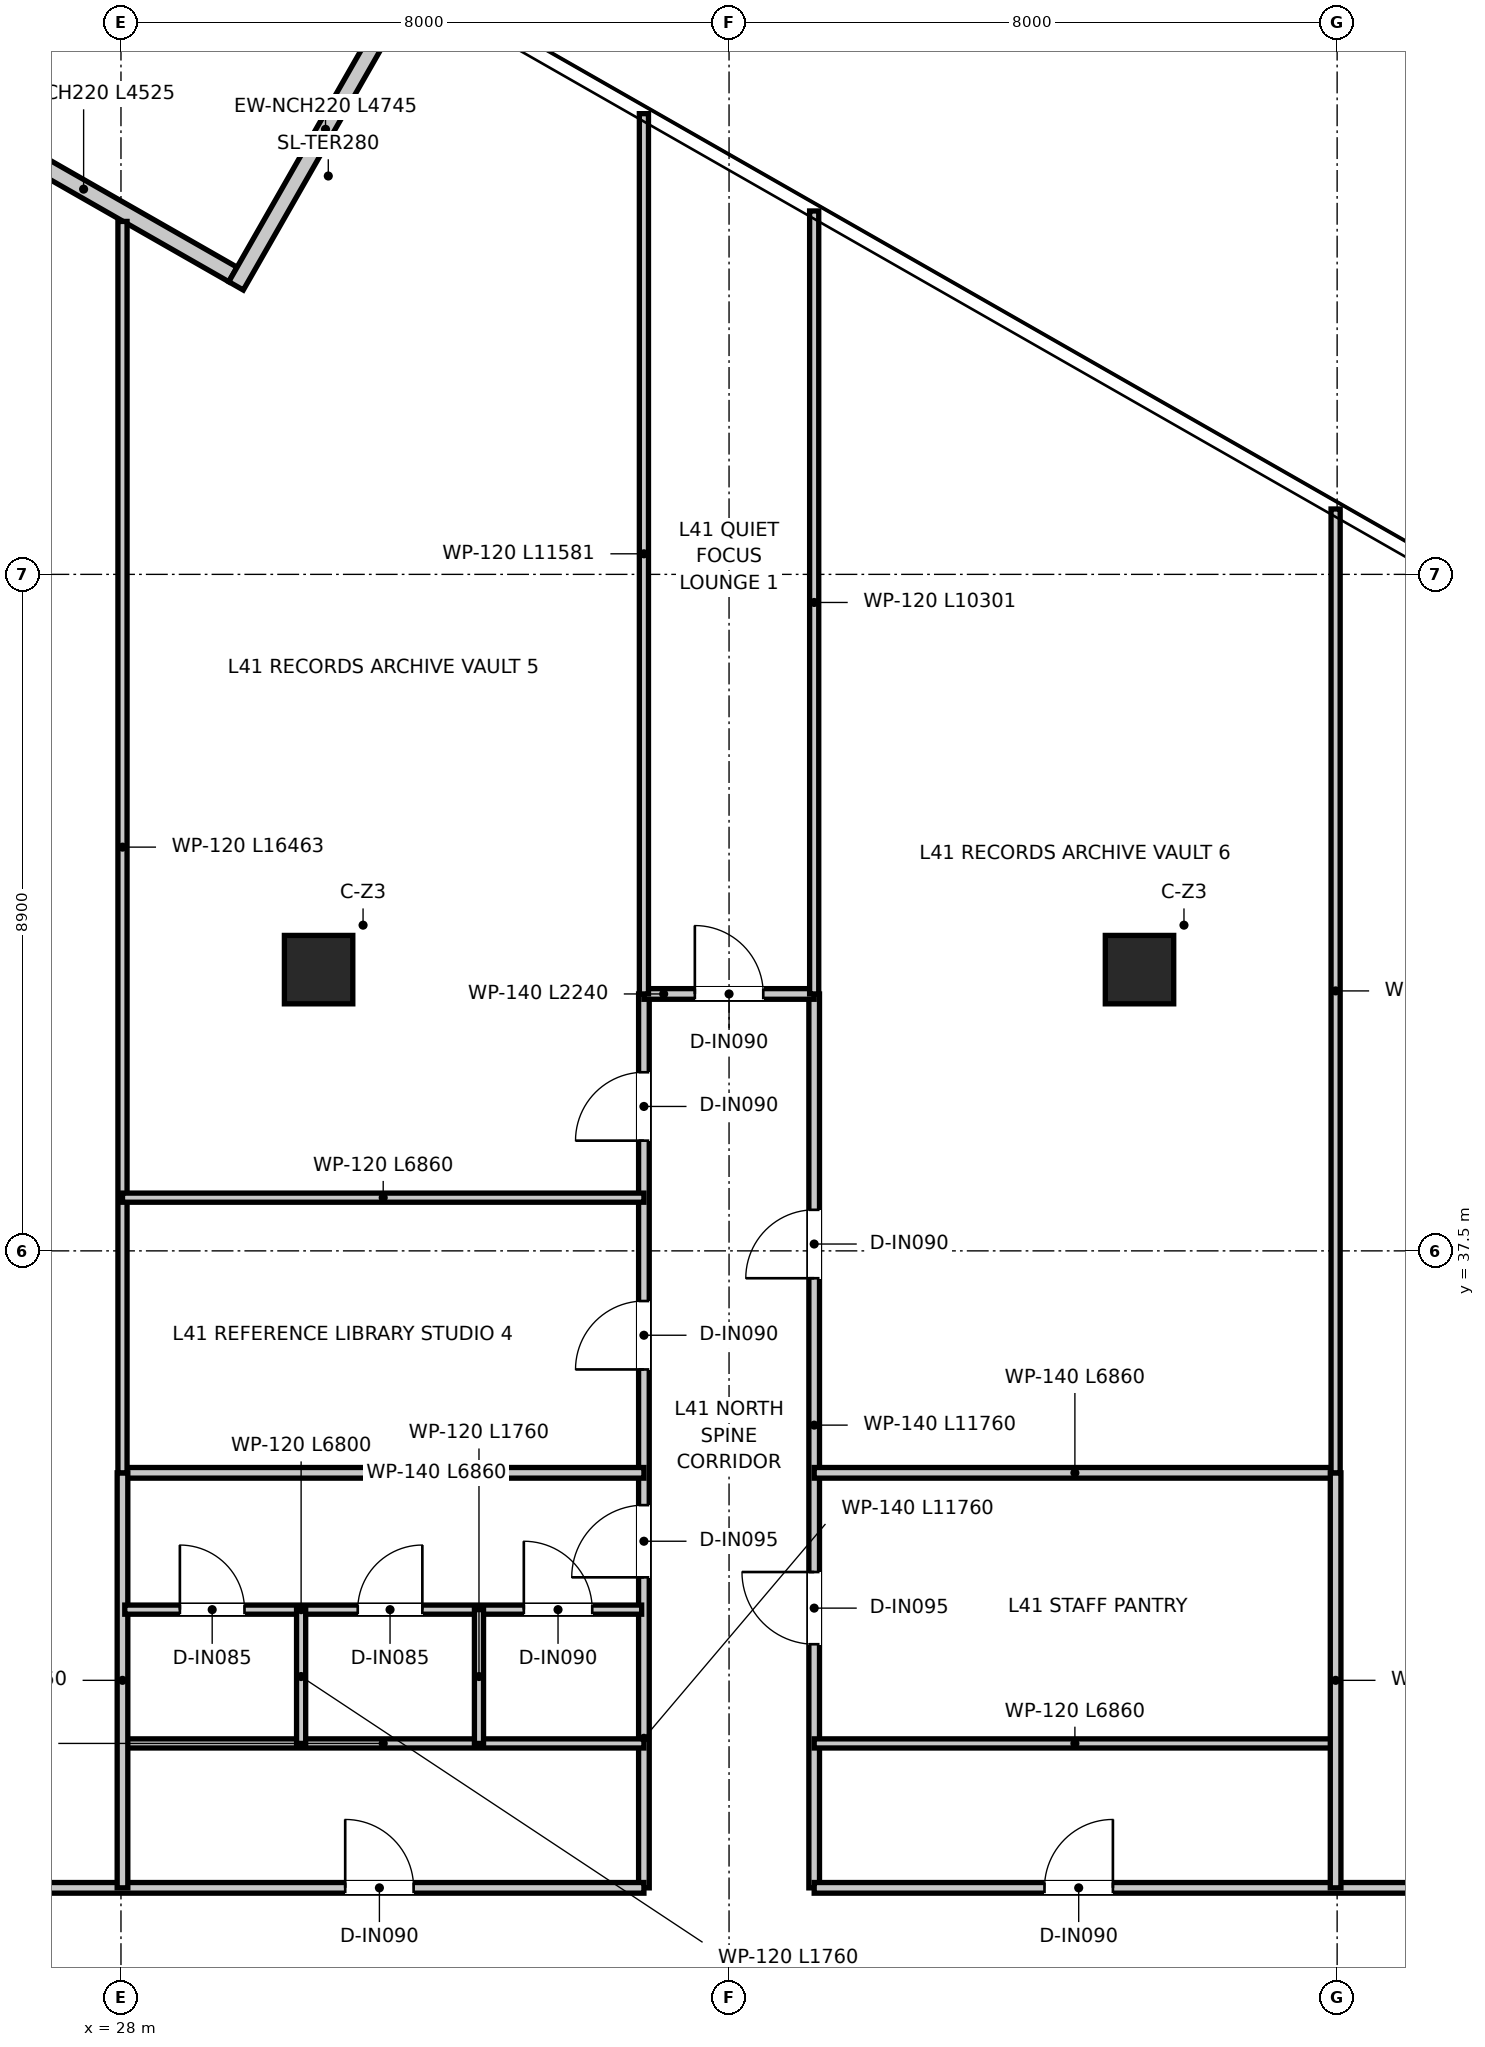
"""IFC4 building model, lengths in metres.
Left out: names, types, materials, properties, quantities, classifications, styles, units other than length and angle.
Written with IfcOpenShell. Run it as: python <this file> out.ifc"""

import sys

from ifc_helpers import new_model, si_unit, direction, frame, frame_2d, origin, origin_2d, place, context, subcontext, project, spatial, rectangle, extrude, source, transform, mapped, element, fill, save


model = new_model("IFC4")
c1 = context("Model", 3, precision=1e-05, world=origin(), true_north=direction((0.0, 1.0)))
c2 = subcontext(c1, "Body", "Model", "MODEL_VIEW")
j1 = project(units=[si_unit("LENGTHUNIT", "METRE"), si_unit("PLANEANGLEUNIT", "RADIAN")], contexts=[c1])
p1 = place(None, origin())
s1 = spatial("IfcSite", under=j1, at=p1, CompositionType="ELEMENT")
p2 = place(p1, origin())
s2 = spatial("IfcBuilding", under=s1, at=p2, CompositionType="ELEMENT")
p3 = place(p2, frame((0.0, 0.0, 169.9)))
s3 = spatial("IfcBuildingStorey", under=s2, at=p3, CompositionType="ELEMENT", Elevation=169.9)
m1 = source(origin(), c2, "Body", "SweptSolid", [
    extrude(rectangle(XDim=0.9, YDim=0.9, at=origin_2d()), origin(), (0.0, 0.0, 1.0), 3.95),
])
for number, where, z_axis, x_axis in (
    (1, (30.6, 41.2, 0.0), (0.0, 0.0, 1.0), (1.0, 0.0, 0.0)),
    (2, (41.4, 41.2, 0.0), (0.0, 0.0, 1.0), (1.0, 0.0, 0.0)),
):
    element("IfcColumn", number, at=place(p3, frame(where, z_axis=z_axis, x_axis=x_axis)), inside=s3, PredefinedType="COLUMN", context=c2, shape_type="MappedRepresentation", body=[
        mapped(m1, transform((0.0, 0.0, 0.0), x_axis=(1.0, 0.0, 0.0), y_axis=(0.0, 1.0, 0.0), z_axis=(0.0, 0.0, 1.0), scale=1.0)),
    ])
p4 = place(p3, frame((29.473, 50.345, 0.0), z_axis=(0.0, 0.0, 1.0), x_axis=(-0.868170087613, 0.496266761908, 0.0)))
e3 = element("IfcWall", 3, at=p4, inside=s3, PredefinedType="ELEMENTEDWALL", context=c2, shape_type="SweptSolid", body=[
    extrude(rectangle(XDim=4.525, YDim=0.22, at=frame_2d((2.262, 0.0))), origin(), (0.0, 0.0, 1.0), 3.67),
])
p5 = place(p3, frame((31.868, 54.315, 0.0), z_axis=(0.0, 0.0, 1.0), x_axis=(-0.496205429031, -0.868205144076, 0.0)))
e4 = element("IfcWall", 4, at=p5, inside=s3, PredefinedType="ELEMENTEDWALL", context=c2, shape_type="SweptSolid", body=[
    extrude(rectangle(XDim=4.745, YDim=0.22, at=frame_2d((2.373, 0.0))), origin(), (0.0, 0.0, 1.0), 3.67),
])
p6 = place(p3, frame((34.88, 29.12, 0.0), z_axis=(0.0, 0.0, 1.0), x_axis=(0.0, 1.0, 0.0)))
e5 = element("IfcWall", 5, at=p6, inside=s3, PredefinedType="PARTITIONING", context=c2, shape_type="SweptSolid", body=[
    extrude(rectangle(XDim=11.76, YDim=0.14, at=frame_2d((5.88, 0.0))), origin(), (0.0, 0.0, 1.0), 3.03),
])
p7 = place(p6, frame((4.085, 0.0, 0.0)))
e6 = element("IfcOpeningElement", 6, at=p7, cuts=e5, PredefinedType="OPENING", context=c2, shape_type="SweptSolid", body=[
    extrude(rectangle(XDim=0.95, YDim=2.1, at=frame_2d((0.475, 1.05))), frame((0.0, 0.08, 0.0), z_axis=(0.0, -1.0, 0.0), x_axis=(1.0, 0.0, 0.0)), (0.0, 0.0, 1.0), 0.16),
])
p8 = place(p6, frame((6.82, 0.0, 0.0)))
e7 = element("IfcOpeningElement", 7, at=p8, cuts=e5, PredefinedType="OPENING", context=c2, shape_type="SweptSolid", body=[
    extrude(rectangle(XDim=0.9, YDim=2.1, at=frame_2d((0.45, 1.05))), frame((0.0, 0.08, 0.0), z_axis=(0.0, -1.0, 0.0), x_axis=(1.0, 0.0, 0.0)), (0.0, 0.0, 1.0), 0.16),
])
p9 = place(p6, frame((9.83, 0.0, 0.0)))
e8 = element("IfcOpeningElement", 8, at=p9, cuts=e5, PredefinedType="OPENING", context=c2, shape_type="SweptSolid", body=[
    extrude(rectangle(XDim=0.9, YDim=2.1, at=frame_2d((0.45, 1.05))), frame((0.0, 0.08, 0.0), z_axis=(0.0, -1.0, 0.0), x_axis=(1.0, 0.0, 0.0)), (0.0, 0.0, 1.0), 0.16),
])
p10 = place(p3, frame((37.12, 29.12, 0.0), z_axis=(0.0, 0.0, 1.0), x_axis=(0.0, 1.0, 0.0)))
e9 = element("IfcWall", 9, at=p10, inside=s3, PredefinedType="PARTITIONING", context=c2, shape_type="SweptSolid", body=[
    extrude(rectangle(XDim=11.76, YDim=0.14, at=frame_2d((5.88, 0.0))), origin(), (0.0, 0.0, 1.0), 3.03),
])
p11 = place(p10, frame((3.205, 0.0, 0.0)))
e10 = element("IfcOpeningElement", 10, at=p11, cuts=e9, PredefinedType="OPENING", context=c2, shape_type="SweptSolid", body=[
    extrude(rectangle(XDim=0.95, YDim=2.1, at=frame_2d((0.475, 1.05))), frame((0.0, 0.08, 0.0), z_axis=(0.0, -1.0, 0.0), x_axis=(1.0, 0.0, 0.0)), (0.0, 0.0, 1.0), 0.16),
])
p12 = place(p10, frame((8.02, 0.0, 0.0)))
e11 = element("IfcOpeningElement", 11, at=p12, cuts=e9, PredefinedType="OPENING", context=c2, shape_type="SweptSolid", body=[
    extrude(rectangle(XDim=0.9, YDim=2.1, at=frame_2d((0.45, 1.05))), frame((0.0, 0.08, 0.0), z_axis=(0.0, -1.0, 0.0), x_axis=(1.0, 0.0, 0.0)), (0.0, 0.0, 1.0), 0.16),
])
p13 = place(p3, frame((34.88, 40.88, 0.0), z_axis=(0.0, 0.0, 1.0), x_axis=(1.0, 0.0, 0.0)))
e12 = element("IfcWall", 12, at=p13, inside=s3, PredefinedType="PARTITIONING", context=c2, shape_type="SweptSolid", body=[
    extrude(rectangle(XDim=2.24, YDim=0.14, at=frame_2d((1.12, 0.0))), origin(), (0.0, 0.0, 1.0), 3.67),
])
p14 = place(p13, frame((0.67, 0.0, 0.0)))
e13 = element("IfcOpeningElement", 13, at=p14, cuts=e12, PredefinedType="OPENING", context=c2, shape_type="SweptSolid", body=[
    extrude(rectangle(XDim=0.9, YDim=2.1, at=frame_2d((0.45, 1.05))), frame((0.0, 0.08, 0.0), z_axis=(0.0, -1.0, 0.0), x_axis=(1.0, 0.0, 0.0)), (0.0, 0.0, 1.0), 0.16),
])
p15 = place(p3, frame((12.262, 29.12, 0.0), z_axis=(0.0, 0.0, 1.0), x_axis=(1.0, 0.0, 0.0)))
e14 = element("IfcWall", 14, at=p15, inside=s3, PredefinedType="PARTITIONING", context=c2, shape_type="SweptSolid", body=[
    extrude(rectangle(XDim=22.618, YDim=0.14, at=frame_2d((11.309, 0.0))), origin(), (0.0, 0.0, 1.0), 3.03),
])
p16 = place(p15, frame((18.688, 0.0, 0.0)))
e15 = element("IfcOpeningElement", 15, at=p16, cuts=e14, PredefinedType="OPENING", context=c2, shape_type="SweptSolid", body=[
    extrude(rectangle(XDim=0.9, YDim=2.1, at=frame_2d((0.45, 1.05))), frame((0.0, 0.08, 0.0), z_axis=(0.0, -1.0, 0.0), x_axis=(1.0, 0.0, 0.0)), (0.0, 0.0, 1.0), 0.16),
])
p17 = place(p15, frame((3.514, 0.0, 0.0)))
e16 = element("IfcOpeningElement", 16, at=p17, cuts=e14, PredefinedType="OPENING", context=c2, shape_type="SweptSolid", body=[
    extrude(rectangle(XDim=0.9, YDim=2.1, at=frame_2d((0.45, 1.05))), frame((0.0, 0.08, 0.0), z_axis=(0.0, -1.0, 0.0), x_axis=(1.0, 0.0, 0.0)), (0.0, 0.0, 1.0), 0.16),
])
p18 = place(p15, frame((12.588, 0.0, 0.0)))
e17 = element("IfcOpeningElement", 17, at=p18, cuts=e14, PredefinedType="OPENING", context=c2, shape_type="SweptSolid", body=[
    extrude(rectangle(XDim=0.9, YDim=2.1, at=frame_2d((0.45, 1.05))), frame((0.0, 0.08, 0.0), z_axis=(0.0, -1.0, 0.0), x_axis=(1.0, 0.0, 0.0)), (0.0, 0.0, 1.0), 0.16),
])
p19 = place(p3, frame((37.12, 29.12, 0.0), z_axis=(0.0, 0.0, 1.0), x_axis=(1.0, 0.0, 0.0)))
e18 = element("IfcWall", 18, at=p19, inside=s3, PredefinedType="PARTITIONING", context=c2, shape_type="SweptSolid", body=[
    extrude(rectangle(XDim=25.384, YDim=0.14, at=frame_2d((12.692, 0.0))), origin(), (0.0, 0.0, 1.0), 3.03),
])
p20 = place(p19, frame((3.03, 0.0, 0.0)))
e19 = element("IfcOpeningElement", 19, at=p20, cuts=e18, PredefinedType="OPENING", context=c2, shape_type="SweptSolid", body=[
    extrude(rectangle(XDim=0.9, YDim=2.1, at=frame_2d((0.45, 1.05))), frame((0.0, 0.08, 0.0), z_axis=(0.0, -1.0, 0.0), x_axis=(1.0, 0.0, 0.0)), (0.0, 0.0, 1.0), 0.16),
])
p21 = place(p19, frame((8.42, 0.0, 0.0)))
e20 = element("IfcOpeningElement", 20, at=p21, cuts=e18, PredefinedType="OPENING", context=c2, shape_type="SweptSolid", body=[
    extrude(rectangle(XDim=0.9, YDim=2.1, at=frame_2d((0.45, 1.05))), frame((0.0, 0.08, 0.0), z_axis=(0.0, -1.0, 0.0), x_axis=(1.0, 0.0, 0.0)), (0.0, 0.0, 1.0), 0.16),
])
p22 = place(p19, frame((11.93, 0.0, 0.0)))
e21 = element("IfcOpeningElement", 21, at=p22, cuts=e18, PredefinedType="OPENING", context=c2, shape_type="SweptSolid", body=[
    extrude(rectangle(XDim=0.9, YDim=2.1, at=frame_2d((0.45, 1.05))), frame((0.0, 0.08, 0.0), z_axis=(0.0, -1.0, 0.0), x_axis=(1.0, 0.0, 0.0)), (0.0, 0.0, 1.0), 0.16),
])
p23 = place(p19, frame((19.204, 0.0, 0.0)))
e22 = element("IfcOpeningElement", 22, at=p23, cuts=e18, PredefinedType="OPENING", context=c2, shape_type="SweptSolid", body=[
    extrude(rectangle(XDim=0.9, YDim=2.1, at=frame_2d((0.45, 1.05))), frame((0.0, 0.08, 0.0), z_axis=(0.0, -1.0, 0.0), x_axis=(1.0, 0.0, 0.0)), (0.0, 0.0, 1.0), 0.16),
])
for number, where, z_axis, x_axis in (
    (23, (28.02, 31.02, 0.0), (0.0, 0.0, 1.0), (1.0, 0.0, 0.0)),
    (24, (37.12, 31.02, 0.0), (0.0, 0.0, 1.0), (1.0, 0.0, 0.0)),
):
    element("IfcWall", number, at=place(p3, frame(where, z_axis=z_axis, x_axis=x_axis)), inside=s3, PredefinedType="PARTITIONING", context=c2, shape_type="SweptSolid", body=[
        extrude(rectangle(XDim=6.86, YDim=0.12, at=frame_2d((3.43, 0.0))), origin(), (0.0, 0.0, 1.0), 3.08),
    ])
for number, where, z_axis, x_axis in (
    (25, (28.02, 34.58, 0.0), (0.0, 0.0, 1.0), (1.0, 0.0, 0.0)),
    (26, (37.12, 34.58, 0.0), (0.0, 0.0, 1.0), (1.0, 0.0, 0.0)),
):
    element("IfcWall", number, at=place(p3, frame(where, z_axis=z_axis, x_axis=x_axis)), inside=s3, PredefinedType="PARTITIONING", context=c2, shape_type="SweptSolid", body=[
        extrude(rectangle(XDim=6.86, YDim=0.14, at=frame_2d((3.43, 0.0))), origin(), (0.0, 0.0, 1.0), 3.08),
    ])
for number, where, z_axis, x_axis in (
    (27, (28.02, 29.12, 0.0), (0.0, 0.0, 1.0), (0.0, 1.0, 0.0)),
    (28, (43.98, 29.12, 0.0), (0.0, 0.0, 1.0), (0.0, 1.0, 0.0)),
):
    element("IfcWall", number, at=place(p3, frame(where, z_axis=z_axis, x_axis=x_axis)), inside=s3, PredefinedType="PARTITIONING", context=c2, shape_type="SweptSolid", body=[
        extrude(rectangle(XDim=5.46, YDim=0.14, at=frame_2d((2.73, 0.0))), origin(), (0.0, 0.0, 1.0), 3.31),
    ])
p24 = place(p3, frame((28.05, 32.78, 0.0), z_axis=(0.0, 0.0, 1.0), x_axis=(1.0, 0.0, 0.0)))
e29 = element("IfcWall", 29, at=p24, inside=s3, PredefinedType="PARTITIONING", context=c2, shape_type="SweptSolid", body=[
    extrude(rectangle(XDim=6.8, YDim=0.12, at=frame_2d((3.4, 0.0))), origin(), (0.0, 0.0, 1.0), 3.08),
])
p25 = place(p24, frame((0.725, 0.0, 0.0)))
e30 = element("IfcOpeningElement", 30, at=p25, cuts=e29, PredefinedType="OPENING", context=c2, shape_type="SweptSolid", body=[
    extrude(rectangle(XDim=0.85, YDim=2.1, at=frame_2d((0.425, 1.05))), frame((0.0, 0.07, 0.0), z_axis=(0.0, -1.0, 0.0), x_axis=(1.0, 0.0, 0.0)), (0.0, 0.0, 1.0), 0.14),
])
p26 = place(p24, frame((3.065, 0.0, 0.0)))
e31 = element("IfcOpeningElement", 31, at=p26, cuts=e29, PredefinedType="OPENING", context=c2, shape_type="SweptSolid", body=[
    extrude(rectangle(XDim=0.85, YDim=2.1, at=frame_2d((0.425, 1.05))), frame((0.0, 0.07, 0.0), z_axis=(0.0, -1.0, 0.0), x_axis=(1.0, 0.0, 0.0)), (0.0, 0.0, 1.0), 0.14),
])
p27 = place(p24, frame((5.25, 0.0, 0.0)))
e32 = element("IfcOpeningElement", 32, at=p27, cuts=e29, PredefinedType="OPENING", context=c2, shape_type="SweptSolid", body=[
    extrude(rectangle(XDim=0.9, YDim=2.1, at=frame_2d((0.45, 1.05))), frame((0.0, 0.07, 0.0), z_axis=(0.0, -1.0, 0.0), x_axis=(1.0, 0.0, 0.0)), (0.0, 0.0, 1.0), 0.14),
])
p28 = place(p3, frame((30.37, 31.02, 0.0), z_axis=(0.0, 0.0, 1.0), x_axis=(0.0, 1.0, 0.0)))
e33 = element("IfcWall", 33, at=p28, inside=s3, PredefinedType="PARTITIONING", context=c2, shape_type="SweptSolid", body=[
    extrude(rectangle(XDim=1.76, YDim=0.12, at=frame_2d((0.88, 0.0))), origin(), (0.0, 0.0, 1.0), 3.08),
])
p29 = place(p3, frame((32.71, 31.02, 0.0), z_axis=(0.0, 0.0, 1.0), x_axis=(0.0, 1.0, 0.0)))
e34 = element("IfcWall", 34, at=p29, inside=s3, PredefinedType="PARTITIONING", context=c2, shape_type="SweptSolid", body=[
    extrude(rectangle(XDim=1.76, YDim=0.12, at=frame_2d((0.88, 0.0))), origin(), (0.0, 0.0, 1.0), 3.67),
])
p30 = place(p3, frame((34.88, 40.88, 0.0), z_axis=(0.0, 0.0, 1.0), x_axis=(0.0, 1.0, 0.0)))
e35 = element("IfcWall", 35, at=p30, inside=s3, PredefinedType="PARTITIONING", context=c2, shape_type="SweptSolid", body=[
    extrude(rectangle(XDim=11.581, YDim=0.12, at=frame_2d((5.791, 0.0))), origin(), (0.0, 0.0, 1.0), 3.28),
])
p31 = place(p3, frame((37.12, 40.88, 0.0), z_axis=(0.0, 0.0, 1.0), x_axis=(0.0, 1.0, 0.0)))
e36 = element("IfcWall", 36, at=p31, inside=s3, PredefinedType="PARTITIONING", context=c2, shape_type="SweptSolid", body=[
    extrude(rectangle(XDim=10.301, YDim=0.12, at=frame_2d((5.15, 0.0))), origin(), (0.0, 0.0, 1.0), 3.28),
])
p32 = place(p3, frame((28.02, 34.58, 0.0), z_axis=(0.0, 0.0, 1.0), x_axis=(0.0, 1.0, 0.0)))
e37 = element("IfcWall", 37, at=p32, inside=s3, PredefinedType="PARTITIONING", context=c2, shape_type="SweptSolid", body=[
    extrude(rectangle(XDim=16.463, YDim=0.12, at=frame_2d((8.231, 0.0))), origin(), (0.0, 0.0, 1.0), 3.03),
])
p33 = place(p3, frame((43.98, 34.58, 0.0), z_axis=(0.0, 0.0, 1.0), x_axis=(0.0, 1.0, 0.0)))
e38 = element("IfcWall", 38, at=p33, inside=s3, PredefinedType="PARTITIONING", context=c2, shape_type="SweptSolid", body=[
    extrude(rectangle(XDim=12.68, YDim=0.12, at=frame_2d((6.34, 0.0))), origin(), (0.0, 0.0, 1.0), 3.03),
])
p34 = place(p3, frame((28.02, 38.2, 0.0), z_axis=(0.0, 0.0, 1.0), x_axis=(1.0, 0.0, 0.0)))
e39 = element("IfcWall", 39, at=p34, inside=s3, PredefinedType="PARTITIONING", context=c2, shape_type="SweptSolid", body=[
    extrude(rectangle(XDim=6.86, YDim=0.12, at=frame_2d((3.43, 0.0))), origin(), (0.0, 0.0, 1.0), 3.08),
])
p35 = place(p16, origin())
e40 = element("IfcDoor", 40, at=p35, inside=s3, OperationType="SINGLE_SWING_LEFT", PredefinedType="DOOR", context=c2, shape_type="SweptSolid", body=[
    extrude(rectangle(XDim=0.9, YDim=2.1, at=frame_2d((0.45, 1.05))), frame((0.0, 0.025, 0.0), z_axis=(0.0, -1.0, 0.0), x_axis=(1.0, 0.0, 0.0)), (0.0, 0.0, 1.0), 0.05),
])
fill(e15, e40)
p36 = place(p20, origin())
e41 = element("IfcDoor", 41, at=p36, inside=s3, OperationType="SINGLE_SWING_RIGHT", PredefinedType="DOOR", context=c2, shape_type="SweptSolid", body=[
    extrude(rectangle(XDim=0.9, YDim=2.1, at=frame_2d((0.45, 1.05))), frame((0.0, 0.025, 0.0), z_axis=(0.0, -1.0, 0.0), x_axis=(1.0, 0.0, 0.0)), (0.0, 0.0, 1.0), 0.05),
])
fill(e19, e41)
p37 = place(p7, origin())
e42 = element("IfcDoor", 42, at=p37, inside=s3, OperationType="SINGLE_SWING_LEFT", PredefinedType="DOOR", context=c2, shape_type="SweptSolid", body=[
    extrude(rectangle(XDim=0.95, YDim=2.1, at=frame_2d((0.475, 1.05))), frame((0.0, 0.025, 0.0), z_axis=(0.0, -1.0, 0.0), x_axis=(1.0, 0.0, 0.0)), (0.0, 0.0, 1.0), 0.05),
])
fill(e6, e42)
p38 = place(p11, origin())
e43 = element("IfcDoor", 43, at=p38, inside=s3, OperationType="SINGLE_SWING_RIGHT", PredefinedType="DOOR", context=c2, shape_type="SweptSolid", body=[
    extrude(rectangle(XDim=0.95, YDim=2.1, at=frame_2d((0.475, 1.05))), frame((0.0, 0.025, 0.0), z_axis=(0.0, -1.0, 0.0), x_axis=(1.0, 0.0, 0.0)), (0.0, 0.0, 1.0), 0.05),
])
fill(e10, e43)
p39 = place(p25, origin())
e44 = element("IfcDoor", 44, at=p39, inside=s3, OperationType="SINGLE_SWING_LEFT", PredefinedType="DOOR", context=c2, shape_type="SweptSolid", body=[
    extrude(rectangle(XDim=0.85, YDim=2.1, at=frame_2d((0.425, 1.05))), frame((0.0, 0.025, 0.0), z_axis=(0.0, -1.0, 0.0), x_axis=(1.0, 0.0, 0.0)), (0.0, 0.0, 1.0), 0.05),
])
fill(e30, e44)
p40 = place(p26, origin())
e45 = element("IfcDoor", 45, at=p40, inside=s3, OperationType="SINGLE_SWING_RIGHT", PredefinedType="DOOR", context=c2, shape_type="SweptSolid", body=[
    extrude(rectangle(XDim=0.85, YDim=2.1, at=frame_2d((0.425, 1.05))), frame((0.0, 0.025, 0.0), z_axis=(0.0, -1.0, 0.0), x_axis=(1.0, 0.0, 0.0)), (0.0, 0.0, 1.0), 0.05),
])
fill(e31, e45)
p41 = place(p27, origin())
e46 = element("IfcDoor", 46, at=p41, inside=s3, OperationType="SINGLE_SWING_LEFT", PredefinedType="DOOR", context=c2, shape_type="SweptSolid", body=[
    extrude(rectangle(XDim=0.9, YDim=2.1, at=frame_2d((0.45, 1.05))), frame((0.0, 0.025, 0.0), z_axis=(0.0, -1.0, 0.0), x_axis=(1.0, 0.0, 0.0)), (0.0, 0.0, 1.0), 0.05),
])
fill(e32, e46)
p42 = place(p14, origin())
e47 = element("IfcDoor", 47, at=p42, inside=s3, OperationType="SINGLE_SWING_LEFT", PredefinedType="DOOR", context=c2, shape_type="SweptSolid", body=[
    extrude(rectangle(XDim=0.9, YDim=2.1, at=frame_2d((0.45, 1.05))), frame((0.0, 0.025, 0.0), z_axis=(0.0, -1.0, 0.0), x_axis=(1.0, 0.0, 0.0)), (0.0, 0.0, 1.0), 0.05),
])
fill(e13, e47)
p43 = place(p8, origin())
e48 = element("IfcDoor", 48, at=p43, inside=s3, OperationType="SINGLE_SWING_LEFT", PredefinedType="DOOR", context=c2, shape_type="SweptSolid", body=[
    extrude(rectangle(XDim=0.9, YDim=2.1, at=frame_2d((0.45, 1.05))), frame((0.0, 0.025, 0.0), z_axis=(0.0, -1.0, 0.0), x_axis=(1.0, 0.0, 0.0)), (0.0, 0.0, 1.0), 0.05),
])
fill(e7, e48)
p44 = place(p9, origin())
e49 = element("IfcDoor", 49, at=p44, inside=s3, OperationType="SINGLE_SWING_LEFT", PredefinedType="DOOR", context=c2, shape_type="SweptSolid", body=[
    extrude(rectangle(XDim=0.9, YDim=2.1, at=frame_2d((0.45, 1.05))), frame((0.0, 0.025, 0.0), z_axis=(0.0, -1.0, 0.0), x_axis=(1.0, 0.0, 0.0)), (0.0, 0.0, 1.0), 0.05),
])
fill(e8, e49)
p45 = place(p12, origin())
e50 = element("IfcDoor", 50, at=p45, inside=s3, OperationType="SINGLE_SWING_LEFT", PredefinedType="DOOR", context=c2, shape_type="SweptSolid", body=[
    extrude(rectangle(XDim=0.9, YDim=2.1, at=frame_2d((0.45, 1.05))), frame((0.0, 0.025, 0.0), z_axis=(0.0, -1.0, 0.0), x_axis=(1.0, 0.0, 0.0)), (0.0, 0.0, 1.0), 0.05),
])
fill(e11, e50)
save(model, sys.argv[1])
